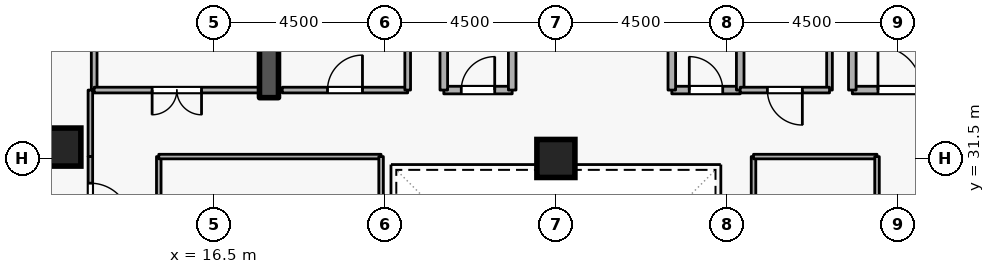
"""IFC4 building model, lengths in metres.
Left out: names, types, materials, properties, quantities, classifications, styles, units other than length and angle.
Written with IfcOpenShell. Run it as: python <this file> out.ifc"""

import sys

from ifc_helpers import new_model, si_unit, direction, frame, frame_2d, origin, origin_2d, place, context, subcontext, project, spatial, rectangle, extrude, element, fill, save


model = new_model("IFC4")
c1 = context("Model", 3, precision=1e-05, world=origin(), true_north=direction((0.0, 1.0)))
c2 = subcontext(c1, "Body", "Model", "MODEL_VIEW")
j1 = project(units=[si_unit("LENGTHUNIT", "METRE"), si_unit("PLANEANGLEUNIT", "RADIAN")], contexts=[c1])
p1 = place(None, origin())
s1 = spatial("IfcSite", under=j1, at=p1, CompositionType="ELEMENT")
p2 = place(p1, origin())
s2 = spatial("IfcBuilding", under=s1, at=p2, CompositionType="ELEMENT")
p3 = place(p2, frame((0.0, 0.0, 203.7)))
s3 = spatial("IfcBuildingStorey", under=s2, at=p3, CompositionType="ELEMENT", Elevation=203.7)
p4 = place(p3, frame((17.95, 33.1, 0.0), z_axis=(0.0, 0.0, 1.0), x_axis=(0.0, 1.0, 0.0)))
e1 = element("IfcWall", 1, at=p4, inside=s3, PredefinedType="SHEAR", context=c2, shape_type="SweptSolid", body=[
    extrude(rectangle(XDim=5.8, YDim=0.5, at=frame_2d((2.9, 0.0))), origin(), (0.0, 0.0, 1.0), 3.6),
])
for number, where, z_axis, x_axis in (
    (2, (12.5, 31.8, 0.0), (0.0, 0.0, 1.0), (1.0, 0.0, 0.0)),
    (3, (25.5, 31.5, 0.0), (0.0, 0.0, 1.0), (1.0, 0.0, 0.0)),
):
    element("IfcColumn", number, at=place(p3, frame(where, z_axis=z_axis, x_axis=x_axis)), inside=s3, PredefinedType="COLUMN", context=c2, shape_type="SweptSolid", body=[
        extrude(rectangle(XDim=1.0, YDim=1.0, at=origin_2d()), origin(), (0.0, 0.0, 1.0), 3.6),
    ])
p5 = place(p3, frame((33.3, 33.3, 0.0), z_axis=(0.0, 0.0, 1.0), x_axis=(1.0, 0.0, 0.0)))
e4 = element("IfcWall", 4, at=p5, inside=s3, PredefinedType="STANDARD", context=c2, shape_type="SweptSolid", body=[
    extrude(rectangle(XDim=2.5, YDim=0.2, at=frame_2d((1.25, 0.0))), origin(), (0.0, 0.0, 1.0), 3.34),
])
p6 = place(p5, frame((0.675, 0.0, 0.0)))
e5 = element("IfcOpeningElement", 5, at=p6, cuts=e4, PredefinedType="OPENING", context=c2, shape_type="SweptSolid", body=[
    extrude(rectangle(XDim=1.15, YDim=2.1, at=frame_2d((0.575, 1.05))), frame((0.0, 0.11, 0.0), z_axis=(0.0, -1.0, 0.0), x_axis=(1.0, 0.0, 0.0)), (0.0, 0.0, 1.0), 0.22),
])
p7 = place(p3, frame((33.3, 35.6, 0.0), z_axis=(0.0, 0.0, 1.0), x_axis=(0.0, -1.0, 0.0)))
e6 = element("IfcWall", 6, at=p7, inside=s3, PredefinedType="STANDARD", context=c2, shape_type="SweptSolid", body=[
    extrude(rectangle(XDim=2.3, YDim=0.2, at=frame_2d((1.15, 0.0))), origin(), (0.0, 0.0, 1.0), 2.545),
])
p8 = place(p3, frame((22.55, 33.3, 0.0), z_axis=(0.0, 0.0, 1.0), x_axis=(1.0, 0.0, 0.0)))
e7 = element("IfcWall", 7, at=p8, inside=s3, PredefinedType="STANDARD", context=c2, shape_type="SweptSolid", body=[
    extrude(rectangle(XDim=1.8, YDim=0.2, at=frame_2d((0.9, 0.0))), origin(), (0.0, 0.0, 1.0), 3.34),
])
p9 = place(p8, frame((0.46, 0.0, 0.0)))
e8 = element("IfcOpeningElement", 8, at=p9, cuts=e7, PredefinedType="OPENING", context=c2, shape_type="SweptSolid", body=[
    extrude(rectangle(XDim=0.88, YDim=2.04, at=frame_2d((0.44, 1.02))), frame((0.0, 0.11, 0.0), z_axis=(0.0, -1.0, 0.0), x_axis=(1.0, 0.0, 0.0)), (0.0, 0.0, 1.0), 0.22),
])
for number, where, z_axis, x_axis in (
    (9, (24.35, 33.3, 0.0), (0.0, 0.0, 1.0), (0.0, 1.0, 0.0)),
    (10, (22.55, 35.35, 0.0), (0.0, 0.0, 1.0), (0.0, -1.0, 0.0)),
):
    element("IfcWall", number, at=place(p3, frame(where, z_axis=z_axis, x_axis=x_axis)), inside=s3, PredefinedType="STANDARD", context=c2, shape_type="SweptSolid", body=[
        extrude(rectangle(XDim=2.05, YDim=0.2, at=frame_2d((1.025, 0.0))), origin(), (0.0, 0.0, 1.0), 3.34),
    ])
p10 = place(p3, frame((28.55, 33.3, 0.0), z_axis=(0.0, 0.0, 1.0), x_axis=(1.0, 0.0, 0.0)))
e11 = element("IfcWall", 11, at=p10, inside=s3, PredefinedType="STANDARD", context=c2, shape_type="SweptSolid", body=[
    extrude(rectangle(XDim=1.8, YDim=0.2, at=frame_2d((0.9, 0.0))), origin(), (0.0, 0.0, 1.0), 3.34),
])
p11 = place(p10, frame((0.46, 0.0, 0.0)))
e12 = element("IfcOpeningElement", 12, at=p11, cuts=e11, PredefinedType="OPENING", context=c2, shape_type="SweptSolid", body=[
    extrude(rectangle(XDim=0.88, YDim=2.04, at=frame_2d((0.44, 1.02))), frame((0.0, 0.11, 0.0), z_axis=(0.0, -1.0, 0.0), x_axis=(1.0, 0.0, 0.0)), (0.0, 0.0, 1.0), 0.22),
])
for number, where, z_axis, x_axis in (
    (13, (30.35, 33.3, 0.0), (0.0, 0.0, 1.0), (0.0, 1.0, 0.0)),
    (14, (28.55, 35.35, 0.0), (0.0, 0.0, 1.0), (0.0, -1.0, 0.0)),
):
    element("IfcWall", number, at=place(p3, frame(where, z_axis=z_axis, x_axis=x_axis)), inside=s3, PredefinedType="STANDARD", context=c2, shape_type="SweptSolid", body=[
        extrude(rectangle(XDim=2.05, YDim=0.2, at=frame_2d((1.025, 0.0))), origin(), (0.0, 0.0, 1.0), 3.34),
    ])
p12 = place(p3, frame((18.3, 33.3, 0.0), z_axis=(0.0, 0.0, 1.0), x_axis=(1.0, 0.0, 0.0)))
e15 = element("IfcWall", 15, at=p12, inside=s3, PredefinedType="PARTITIONING", context=c2, shape_type="SweptSolid", body=[
    extrude(rectangle(XDim=3.3, YDim=0.15, at=frame_2d((1.65, 0.0))), origin(), (0.0, 0.0, 1.0), 3.34),
])
p13 = place(p12, frame((1.19, 0.0, 0.0)))
e16 = element("IfcOpeningElement", 16, at=p13, cuts=e15, PredefinedType="OPENING", context=c2, shape_type="SweptSolid", body=[
    extrude(rectangle(XDim=0.92, YDim=2.08, at=frame_2d((0.46, 1.04))), frame((0.0, 0.085, 0.0), z_axis=(0.0, -1.0, 0.0), x_axis=(1.0, 0.0, 0.0)), (0.0, 0.0, 1.0), 0.17),
])
p14 = place(p3, frame((21.6, 33.3, 0.0), z_axis=(0.0, 0.0, 1.0), x_axis=(0.0, 1.0, 0.0)))
e17 = element("IfcWall", 17, at=p14, inside=s3, PredefinedType="PARTITIONING", context=c2, shape_type="SweptSolid", body=[
    extrude(rectangle(XDim=2.05, YDim=0.15, at=frame_2d((1.025, 0.0))), origin(), (0.0, 0.0, 1.0), 3.34),
])
p15 = place(p3, frame((32.7, 35.35, 0.0), z_axis=(0.0, 0.0, 1.0), x_axis=(0.0, -1.0, 0.0)))
e18 = element("IfcWall", 18, at=p15, inside=s3, PredefinedType="PARTITIONING", context=c2, shape_type="SweptSolid", body=[
    extrude(rectangle(XDim=2.05, YDim=0.15, at=frame_2d((1.025, 0.0))), origin(), (0.0, 0.0, 1.0), 2.545),
])
p16 = place(p3, frame((32.7, 33.3, 0.0), z_axis=(0.0, 0.0, 1.0), x_axis=(-1.0, 0.0, 0.0)))
e19 = element("IfcWall", 19, at=p16, inside=s3, PredefinedType="PARTITIONING", context=c2, shape_type="SweptSolid", body=[
    extrude(rectangle(XDim=2.35, YDim=0.15, at=frame_2d((1.175, 0.0))), origin(), (0.0, 0.0, 1.0), 3.34),
])
p17 = place(p16, frame((0.715, 0.0, 0.0)))
e20 = element("IfcOpeningElement", 20, at=p17, cuts=e19, PredefinedType="OPENING", context=c2, shape_type="SweptSolid", body=[
    extrude(rectangle(XDim=0.92, YDim=2.08, at=frame_2d((0.46, 1.04))), frame((0.0, 0.085, 0.0), z_axis=(0.0, -1.0, 0.0), x_axis=(1.0, 0.0, 0.0)), (0.0, 0.0, 1.0), 0.17),
])
p18 = place(p3, frame((13.35, 33.3, 0.0), z_axis=(0.0, 0.0, 1.0), x_axis=(0.0, 1.0, 0.0)))
e21 = element("IfcWall", 21, at=p18, inside=s3, PredefinedType="PARTITIONING", context=c2, shape_type="SweptSolid", body=[
    extrude(rectangle(XDim=17.42, YDim=0.15, at=frame_2d((8.71, 0.0))), origin(), (0.0, 0.0, 1.0), 3.34),
])
p19 = place(p3, frame((17.7, 33.3, 0.0), z_axis=(0.0, 0.0, 1.0), x_axis=(-1.0, 0.0, 0.0)))
e22 = element("IfcWall", 22, at=p19, inside=s3, PredefinedType="PARTITIONING", context=c2, shape_type="SweptSolid", body=[
    extrude(rectangle(XDim=4.35, YDim=0.15, at=frame_2d((2.175, 0.0))), origin(), (0.0, 0.0, 1.0), 3.34),
])
p20 = place(p19, frame((1.525, 0.0, 0.0)))
e23 = element("IfcOpeningElement", 23, at=p20, cuts=e22, PredefinedType="OPENING", context=c2, shape_type="SweptSolid", body=[
    extrude(rectangle(XDim=1.3, YDim=2.12, at=frame_2d((0.65, 1.06))), frame((0.0, 0.085, 0.0), z_axis=(0.0, -1.0, 0.0), x_axis=(1.0, 0.0, 0.0)), (0.0, 0.0, 1.0), 0.17),
])
p21 = place(p3, frame((13.25, 33.3, 0.0), z_axis=(0.0, 0.0, 1.0), x_axis=(0.0, -1.0, 0.0)))
e24 = element("IfcWall", 24, at=p21, inside=s3, PredefinedType="PARTITIONING", context=c2, shape_type="SweptSolid", body=[
    extrude(rectangle(XDim=1.75, YDim=0.12, at=frame_2d((0.875, 0.0))), origin(), (0.0, 0.0, 1.0), 3.34),
])
p22 = place(p3, frame((13.25, 31.55, 0.0), z_axis=(0.0, 0.0, 1.0), x_axis=(0.0, -1.0, 0.0)))
e25 = element("IfcWall", 25, at=p22, inside=s3, PredefinedType="PARTITIONING", context=c2, shape_type="SweptSolid", body=[
    extrude(rectangle(XDim=2.45, YDim=0.12, at=frame_2d((1.225, 0.0))), origin(), (0.0, 0.0, 1.0), 3.34),
])
p23 = place(p22, frame((0.7, 0.0, 0.0)))
e26 = element("IfcOpeningElement", 26, at=p23, cuts=e25, PredefinedType="OPENING", context=c2, shape_type="SweptSolid", body=[
    extrude(rectangle(XDim=1.05, YDim=2.1, at=frame_2d((0.525, 1.05))), frame((0.0, 0.07, 0.0), z_axis=(0.0, -1.0, 0.0), x_axis=(1.0, 0.0, 0.0)), (0.0, 0.0, 1.0), 0.14),
])
p24 = place(p3, frame((15.05, 22.45, 0.0), z_axis=(0.0, 0.0, 1.0), x_axis=(0.0, 1.0, 0.0)))
e27 = element("IfcWall", 27, at=p24, inside=s3, PredefinedType="PARTITIONING", context=c2, shape_type="SweptSolid", body=[
    extrude(rectangle(XDim=9.1, YDim=0.12, at=frame_2d((4.55, 0.0))), origin(), (0.0, 0.0, 1.0), 3.34),
])
p25 = place(p24, frame((4.075, 0.0, 0.0)))
e28 = element("IfcOpeningElement", 28, at=p25, cuts=e27, PredefinedType="OPENING", context=c2, shape_type="SweptSolid", body=[
    extrude(rectangle(XDim=0.95, YDim=2.1, at=frame_2d((0.475, 1.05))), frame((0.0, 0.07, 0.0), z_axis=(0.0, -1.0, 0.0), x_axis=(1.0, 0.0, 0.0)), (0.0, 0.0, 1.0), 0.14),
])
p26 = place(p3, frame((15.05, 31.55, 0.0), z_axis=(0.0, 0.0, 1.0), x_axis=(1.0, 0.0, 0.0)))
e29 = element("IfcWall", 29, at=p26, inside=s3, PredefinedType="PARTITIONING", context=c2, shape_type="SweptSolid", body=[
    extrude(rectangle(XDim=5.85, YDim=0.12, at=frame_2d((2.925, 0.0))), origin(), (0.0, 0.0, 1.0), 3.34),
])
for number, where, z_axis, x_axis in (
    (30, (20.9, 31.55, 0.0), (0.0, 0.0, 1.0), (0.0, -1.0, 0.0)),
    (31, (30.7, 22.45, 0.0), (0.0, 0.0, 1.0), (0.0, 1.0, 0.0)),
):
    element("IfcWall", number, at=place(p3, frame(where, z_axis=z_axis, x_axis=x_axis)), inside=s3, PredefinedType="PARTITIONING", context=c2, shape_type="SweptSolid", body=[
        extrude(rectangle(XDim=9.1, YDim=0.12, at=frame_2d((4.55, 0.0))), origin(), (0.0, 0.0, 1.0), 3.34),
    ])
p27 = place(p3, frame((30.7, 31.55, 0.0), z_axis=(0.0, 0.0, 1.0), x_axis=(1.0, 0.0, 0.0)))
e32 = element("IfcWall", 32, at=p27, inside=s3, PredefinedType="PARTITIONING", context=c2, shape_type="SweptSolid", body=[
    extrude(rectangle(XDim=3.25, YDim=0.12, at=frame_2d((1.625, 0.0))), origin(), (0.0, 0.0, 1.0), 3.34),
])
p28 = place(p3, frame((33.95, 31.55, 0.0), z_axis=(0.0, 0.0, 1.0), x_axis=(0.0, -1.0, 0.0)))
e33 = element("IfcWall", 33, at=p28, inside=s3, PredefinedType="PARTITIONING", context=c2, shape_type="SweptSolid", body=[
    extrude(rectangle(XDim=9.1, YDim=0.12, at=frame_2d((4.55, 0.0))), origin(), (0.0, 0.0, 1.0), 3.34),
])
p29 = place(p28, frame((4.075, 0.0, 0.0)))
e34 = element("IfcOpeningElement", 34, at=p29, cuts=e33, PredefinedType="OPENING", context=c2, shape_type="SweptSolid", body=[
    extrude(rectangle(XDim=0.95, YDim=2.1, at=frame_2d((0.475, 1.05))), frame((0.0, 0.07, 0.0), z_axis=(0.0, -1.0, 0.0), x_axis=(1.0, 0.0, 0.0)), (0.0, 0.0, 1.0), 0.14),
])
p30 = place(p6, origin())
e35 = element("IfcDoor", 35, at=p30, inside=s3, OperationType="SINGLE_SWING_LEFT", PredefinedType="DOOR", context=c2, shape_type="SweptSolid", body=[
    extrude(rectangle(XDim=1.15, YDim=2.1, at=frame_2d((0.575, 1.05))), frame((0.0, 0.025, 0.0), z_axis=(0.0, -1.0, 0.0), x_axis=(1.0, 0.0, 0.0)), (0.0, 0.0, 1.0), 0.05),
])
fill(e5, e35)
p31 = place(p9, origin())
e36 = element("IfcDoor", 36, at=p31, inside=s3, OperationType="SINGLE_SWING_RIGHT", PredefinedType="DOOR", context=c2, shape_type="SweptSolid", body=[
    extrude(rectangle(XDim=0.88, YDim=2.04, at=frame_2d((0.44, 1.02))), frame((0.0, 0.025, 0.0), z_axis=(0.0, -1.0, 0.0), x_axis=(1.0, 0.0, 0.0)), (0.0, 0.0, 1.0), 0.05),
])
fill(e8, e36)
p32 = place(p11, origin())
e37 = element("IfcDoor", 37, at=p32, inside=s3, OperationType="SINGLE_SWING_LEFT", PredefinedType="DOOR", context=c2, shape_type="SweptSolid", body=[
    extrude(rectangle(XDim=0.88, YDim=2.04, at=frame_2d((0.44, 1.02))), frame((0.0, 0.025, 0.0), z_axis=(0.0, -1.0, 0.0), x_axis=(1.0, 0.0, 0.0)), (0.0, 0.0, 1.0), 0.05),
])
fill(e12, e37)
p33 = place(p13, origin())
e38 = element("IfcDoor", 38, at=p33, inside=s3, OperationType="SINGLE_SWING_RIGHT", PredefinedType="DOOR", context=c2, shape_type="SweptSolid", body=[
    extrude(rectangle(XDim=0.92, YDim=2.08, at=frame_2d((0.46, 1.04))), frame((0.0, 0.025, 0.0), z_axis=(0.0, -1.0, 0.0), x_axis=(1.0, 0.0, 0.0)), (0.0, 0.0, 1.0), 0.05),
])
fill(e16, e38)
p34 = place(p17, origin())
e39 = element("IfcDoor", 39, at=p34, inside=s3, OperationType="SINGLE_SWING_LEFT", PredefinedType="DOOR", context=c2, shape_type="SweptSolid", body=[
    extrude(rectangle(XDim=0.92, YDim=2.08, at=frame_2d((0.46, 1.04))), frame((0.0, 0.025, 0.0), z_axis=(0.0, -1.0, 0.0), x_axis=(1.0, 0.0, 0.0)), (0.0, 0.0, 1.0), 0.05),
])
fill(e20, e39)
p35 = place(p20, origin())
e40 = element("IfcDoor", 40, at=p35, inside=s3, OperationType="DOUBLE_DOOR_SINGLE_SWING", PredefinedType="DOOR", context=c2, shape_type="SweptSolid", body=[
    extrude(rectangle(XDim=1.3, YDim=2.12, at=frame_2d((0.65, 1.06))), frame((0.0, 0.025, 0.0), z_axis=(0.0, -1.0, 0.0), x_axis=(1.0, 0.0, 0.0)), (0.0, 0.0, 1.0), 0.05),
])
fill(e23, e40)
p36 = place(p23, origin())
e41 = element("IfcDoor", 41, at=p36, inside=s3, OperationType="SINGLE_SWING_RIGHT", PredefinedType="DOOR", context=c2, shape_type="SweptSolid", body=[
    extrude(rectangle(XDim=1.05, YDim=2.1, at=frame_2d((0.525, 1.05))), frame((0.0, 0.025, 0.0), z_axis=(0.0, -1.0, 0.0), x_axis=(1.0, 0.0, 0.0)), (0.0, 0.0, 1.0), 0.05),
])
fill(e26, e41)
save(model, sys.argv[1])
